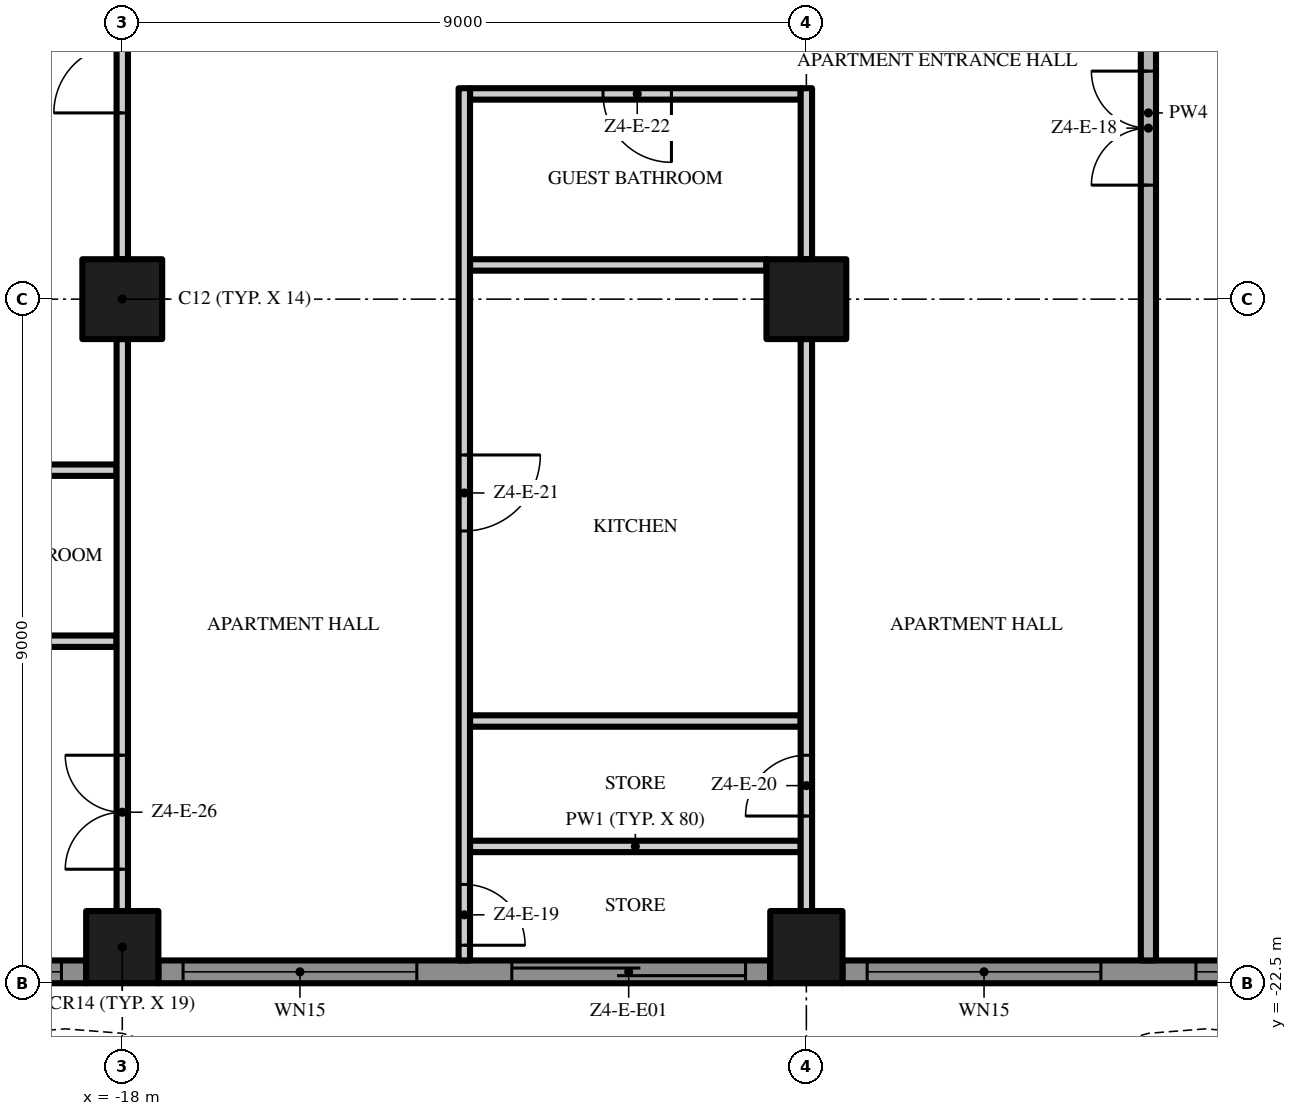
"""IFC4 building model, lengths in metres.
Left out: names, types, materials, properties, quantities, classifications, styles, units other than length and angle.
Written with IfcOpenShell. Run it as: python <this file> out.ifc"""

import sys

from ifc_helpers import new_model, si_unit, direction, frame, frame_2d, origin, origin_2d, place, context, subcontext, project, spatial, polyline, rectangle, outline, extrude, element, fill, save


model = new_model("IFC4")
c1 = context("Model", 3, precision=1e-05, world=origin(), true_north=direction((0.0, 1.0)))
c2 = subcontext(c1, "Body", "Model", "MODEL_VIEW")
j1 = project(units=[si_unit("LENGTHUNIT", "METRE"), si_unit("PLANEANGLEUNIT", "RADIAN")], contexts=[c1])
p1 = place(None, origin())
s1 = spatial("IfcSite", under=j1, at=p1, CompositionType="ELEMENT")
p2 = place(p1, origin())
s2 = spatial("IfcBuilding", under=s1, at=p2, CompositionType="ELEMENT")
p3 = place(p2, frame((0.0, 0.0, 226.2)))
s3 = spatial("IfcBuildingStorey", under=s2, at=p3, CompositionType="ELEMENT", Elevation=226.2)
p4 = place(p3, frame((-18.0, -13.5, 0.0), z_axis=(0.0, 0.0, 1.0), x_axis=(1.0, 0.0, 0.0)))
e1 = element("IfcColumn", 1, at=p4, inside=s3, PredefinedType="COLUMN", context=c2, shape_type="SweptSolid", body=[
    extrude(rectangle(XDim=1.05, YDim=1.05, at=origin_2d()), origin(), (0.0, 0.0, 1.0), 3.5),
])
p5 = place(p3, frame((-18.0, -22.025, 0.0), z_axis=(0.0, 0.0, 1.0), x_axis=(1.0, 0.0, 0.0)))
e2 = element("IfcColumn", 2, at=p5, inside=s3, PredefinedType="COLUMN", context=c2, shape_type="SweptSolid", body=[
    extrude(rectangle(XDim=0.95, YDim=0.95, at=origin_2d()), origin(), (0.0, 0.0, 1.0), 3.5),
])
p6 = place(p3, frame((-9.0, -13.5, 0.0), z_axis=(0.0, 0.0, 1.0), x_axis=(1.0, 0.0, 0.0)))
e3 = element("IfcColumn", 3, at=p6, inside=s3, PredefinedType="COLUMN", context=c2, shape_type="SweptSolid", body=[
    extrude(rectangle(XDim=1.05, YDim=1.05, at=origin_2d()), origin(), (0.0, 0.0, 1.0), 3.5),
])
p7 = place(p3, frame((-9.0, -22.025, 0.0), z_axis=(0.0, 0.0, 1.0), x_axis=(1.0, 0.0, 0.0)))
e4 = element("IfcColumn", 4, at=p7, inside=s3, PredefinedType="COLUMN", context=c2, shape_type="SweptSolid", body=[
    extrude(rectangle(XDim=0.95, YDim=0.95, at=origin_2d()), origin(), (0.0, 0.0, 1.0), 3.5),
])
p8 = place(p3, frame((-18.475, -22.35, 0.0), z_axis=(0.0, 0.0, 1.0), x_axis=(-1.0, 0.0, 0.0)))
e5 = element("IfcWall", 5, at=p8, inside=s3, PredefinedType="SOLIDWALL", context=c2, shape_type="SweptSolid", body=[
    extrude(rectangle(XDim=3.725, YDim=0.3, at=frame_2d((1.863, 0.0))), origin(), (0.0, 0.0, 1.0), 3.5),
])
p9 = place(p8, frame((0.325, 0.0, 0.45)))
e6 = element("IfcOpeningElement", 6, at=p9, cuts=e5, PredefinedType="OPENING", context=c2, shape_type="SweptSolid", body=[
    extrude(rectangle(XDim=3.075, YDim=2.65, at=frame_2d((1.538, 1.325))), frame((0.0, 0.16, 0.0), z_axis=(0.0, -1.0, 0.0), x_axis=(1.0, 0.0, 0.0)), (0.0, 0.0, 1.0), 0.32),
])
p10 = place(p3, frame((-9.475, -22.35, 0.0), z_axis=(0.0, 0.0, 1.0), x_axis=(-1.0, 0.0, 0.0)))
e7 = element("IfcWall", 7, at=p10, inside=s3, PredefinedType="SOLIDWALL", context=c2, shape_type="SweptSolid", body=[
    extrude(rectangle(XDim=8.05, YDim=0.3, at=frame_2d((4.025, 0.0))), origin(), (0.0, 0.0, 1.0), 3.5),
])
p11 = place(p10, frame((4.65, 0.0, 0.45)))
e8 = element("IfcOpeningElement", 8, at=p11, cuts=e7, PredefinedType="OPENING", context=c2, shape_type="SweptSolid", body=[
    extrude(rectangle(XDim=3.075, YDim=2.65, at=frame_2d((1.538, 1.325))), frame((0.0, 0.16, 0.0), z_axis=(0.0, -1.0, 0.0), x_axis=(1.0, 0.0, 0.0)), (0.0, 0.0, 1.0), 0.32),
])
p12 = place(p10, frame((0.325, 0.0, 0.0)))
e9 = element("IfcOpeningElement", 9, at=p12, cuts=e7, PredefinedType="OPENING", context=c2, shape_type="SweptSolid", body=[
    extrude(rectangle(XDim=3.075, YDim=2.4, at=frame_2d((1.538, 1.2))), frame((0.0, 0.16, 0.0), z_axis=(0.0, -1.0, 0.0), x_axis=(1.0, 0.0, 0.0)), (0.0, 0.0, 1.0), 0.32),
])
p13 = place(p3, frame((-0.475, -22.35, 0.0), z_axis=(0.0, 0.0, 1.0), x_axis=(-1.0, 0.0, 0.0)))
e10 = element("IfcWall", 10, at=p13, inside=s3, PredefinedType="SOLIDWALL", context=c2, shape_type="SweptSolid", body=[
    extrude(rectangle(XDim=8.05, YDim=0.3, at=frame_2d((4.025, 0.0))), origin(), (0.0, 0.0, 1.0), 3.5),
])
p14 = place(p13, frame((4.65, 0.0, 0.45)))
e11 = element("IfcOpeningElement", 11, at=p14, cuts=e10, PredefinedType="OPENING", context=c2, shape_type="SweptSolid", body=[
    extrude(rectangle(XDim=3.075, YDim=2.65, at=frame_2d((1.538, 1.325))), frame((0.0, 0.16, 0.0), z_axis=(0.0, -1.0, 0.0), x_axis=(1.0, 0.0, 0.0)), (0.0, 0.0, 1.0), 0.32),
])
p15 = place(p13, frame((0.325, 0.0, 0.45)))
e12 = element("IfcOpeningElement", 12, at=p15, cuts=e10, PredefinedType="OPENING", context=c2, shape_type="SweptSolid", body=[
    extrude(rectangle(XDim=3.075, YDim=2.65, at=frame_2d((1.538, 1.325))), frame((0.0, 0.16, 0.0), z_axis=(0.0, -1.0, 0.0), x_axis=(1.0, 0.0, 0.0)), (0.0, 0.0, 1.0), 0.32),
])
p16 = place(p3, origin())
e13 = element("IfcWall", 13, at=p16, inside=s3, PredefinedType="USERDEFINED", context=c2, shape_type="SweptSolid", body=[
    extrude(outline(polyline([(-22.5, -24.3), (-21.0, -23.595), (-19.5, -23.159), (-18.75, -23.1), (-18.0, -23.159), (-16.5, -23.595), (-15.0, -24.3), (-13.5, -25.005), (-12.0, -25.441), (-11.25, -25.5), (-10.5, -25.441), (-9.0, -25.005), (-7.5, -24.3), (-6.0, -23.595), (-4.5, -23.159), (-3.75, -23.1), (-3.0, -23.159), (-1.5, -23.595), (0.0, -24.3), (1.5, -25.005), (3.0, -25.441), (3.75, -25.5), (4.5, -25.441), (6.0, -25.005), (7.5, -24.3), (9.0, -23.595), (10.5, -23.159), (11.25, -23.1), (12.0, -23.159), (13.5, -23.595), (15.0, -24.3), (16.5, -25.005), (18.0, -25.441), (18.75, -25.5), (19.5, -25.441), (21.0, -25.005), (22.5, -24.3), (22.394, -24.074), (20.911, -24.771), (19.455, -25.194), (18.75, -25.249), (18.045, -25.194), (16.589, -24.771), (15.106, -24.074), (13.589, -23.36), (12.045, -22.911), (11.25, -22.849), (10.455, -22.911), (8.911, -23.36), (7.394, -24.074), (5.911, -24.771), (4.455, -25.194), (3.75, -25.249), (3.045, -25.194), (1.589, -24.771), (0.106, -24.074), (-1.411, -23.36), (-2.955, -22.911), (-3.75, -22.849), (-4.545, -22.911), (-6.089, -23.36), (-7.606, -24.074), (-9.089, -24.771), (-10.545, -25.194), (-11.25, -25.249), (-11.955, -25.194), (-13.411, -24.771), (-14.894, -24.074), (-16.411, -23.36), (-17.955, -22.911), (-18.75, -22.849), (-19.545, -22.911), (-21.089, -23.36), (-22.606, -24.074), (-22.5, -24.3)])), origin(), (0.0, 0.0, 1.0), 0.9),
])
for number, where, z_axis, x_axis in (
    (14, (-13.425, -20.7, 0.0), (0.0, 0.0, 1.0), (1.0, 0.0, 0.0)),
    (15, (-13.425, -19.05, 0.0), (0.0, 0.0, 1.0), (1.0, 0.0, 0.0)),
):
    element("IfcWall", number, at=place(p3, frame(where, z_axis=z_axis, x_axis=x_axis)), inside=s3, PredefinedType="PARTITIONING", context=c2, shape_type="SweptSolid", body=[
        extrude(rectangle(XDim=4.35, YDim=0.15, at=frame_2d((2.175, 0.0))), origin(), (0.0, 0.0, 1.0), 3.5),
    ])
p17 = place(p3, frame((-22.025, -18.0, 0.0), z_axis=(0.0, 0.0, 1.0), x_axis=(1.0, 0.0, 0.0)))
e16 = element("IfcWall", 16, at=p17, inside=s3, PredefinedType="PARTITIONING", context=c2, shape_type="SweptSolid", body=[
    extrude(rectangle(XDim=3.95, YDim=0.15, at=frame_2d((1.975, 0.0))), origin(), (0.0, 0.0, 1.0), 3.5),
])
p18 = place(p3, frame((-20.925, -15.75, 0.0), z_axis=(0.0, 0.0, 1.0), x_axis=(1.0, 0.0, 0.0)))
e17 = element("IfcWall", 17, at=p18, inside=s3, PredefinedType="PARTITIONING", context=c2, shape_type="SweptSolid", body=[
    extrude(rectangle(XDim=2.85, YDim=0.15, at=frame_2d((1.425, 0.0))), origin(), (0.0, 0.0, 1.0), 3.5),
])
p19 = place(p3, frame((-13.425, -13.05, 0.0), z_axis=(0.0, 0.0, 1.0), x_axis=(1.0, 0.0, 0.0)))
e18 = element("IfcWall", 18, at=p19, inside=s3, PredefinedType="PARTITIONING", context=c2, shape_type="SweptSolid", body=[
    extrude(rectangle(XDim=3.9, YDim=0.15, at=frame_2d((1.95, 0.0))), origin(), (0.0, 0.0, 1.0), 3.5),
])
p20 = place(p3, frame((-9.075, -10.8, 0.0), z_axis=(0.0, 0.0, 1.0), x_axis=(-1.0, 0.0, 0.0)))
e19 = element("IfcWall", 19, at=p20, inside=s3, PredefinedType="PARTITIONING", context=c2, shape_type="SweptSolid", body=[
    extrude(rectangle(XDim=4.35, YDim=0.15, at=frame_2d((2.175, 0.0))), origin(), (0.0, 0.0, 1.0), 3.5),
])
p21 = place(p20, frame((1.7, 0.0, 0.0)))
e20 = element("IfcOpeningElement", 20, at=p21, cuts=e19, PredefinedType="OPENING", context=c2, shape_type="SweptSolid", body=[
    extrude(rectangle(XDim=0.9, YDim=2.1, at=frame_2d((0.45, 1.05))), frame((0.0, 0.085, 0.0), z_axis=(0.0, -1.0, 0.0), x_axis=(1.0, 0.0, 0.0)), (0.0, 0.0, 1.0), 0.17),
])
p22 = place(p3, frame((-18.0, -21.55, 0.0), z_axis=(0.0, 0.0, 1.0), x_axis=(0.0, 1.0, 0.0)))
e21 = element("IfcWall", 21, at=p22, inside=s3, PredefinedType="PARTITIONING", context=c2, shape_type="SweptSolid", body=[
    extrude(rectangle(XDim=7.525, YDim=0.15, at=frame_2d((3.763, 0.0))), origin(), (0.0, 0.0, 1.0), 3.5),
])
p23 = place(p22, frame((0.55, 0.0, 0.0)))
e22 = element("IfcOpeningElement", 22, at=p23, cuts=e21, PredefinedType="OPENING", context=c2, shape_type="SweptSolid", body=[
    extrude(rectangle(XDim=1.5, YDim=2.4, at=frame_2d((0.75, 1.2))), frame((0.0, 0.085, 0.0), z_axis=(0.0, -1.0, 0.0), x_axis=(1.0, 0.0, 0.0)), (0.0, 0.0, 1.0), 0.17),
])
p24 = place(p3, frame((-18.0, -12.975, 0.0), z_axis=(0.0, 0.0, 1.0), x_axis=(0.0, 1.0, 0.0)))
e23 = element("IfcWall", 23, at=p24, inside=s3, PredefinedType="PARTITIONING", context=c2, shape_type="SweptSolid", body=[
    extrude(rectangle(XDim=7.95, YDim=0.15, at=frame_2d((3.975, 0.0))), origin(), (0.0, 0.0, 1.0), 3.5),
])
p25 = place(p24, frame((1.925, 0.0, 0.0)))
e24 = element("IfcOpeningElement", 24, at=p25, cuts=e23, PredefinedType="OPENING", context=c2, shape_type="SweptSolid", body=[
    extrude(rectangle(XDim=1.8, YDim=2.4, at=frame_2d((0.9, 1.2))), frame((0.0, 0.085, 0.0), z_axis=(0.0, -1.0, 0.0), x_axis=(1.0, 0.0, 0.0)), (0.0, 0.0, 1.0), 0.17),
])
p26 = place(p24, frame((6.8, 0.0, 0.0)))
e25 = element("IfcOpeningElement", 25, at=p26, cuts=e23, PredefinedType="OPENING", context=c2, shape_type="SweptSolid", body=[
    extrude(rectangle(XDim=1.0, YDim=2.4, at=frame_2d((0.5, 1.2))), frame((0.0, 0.085, 0.0), z_axis=(0.0, -1.0, 0.0), x_axis=(1.0, 0.0, 0.0)), (0.0, 0.0, 1.0), 0.17),
])
p27 = place(p3, frame((-13.5, -10.725, 0.0), z_axis=(0.0, 0.0, 1.0), x_axis=(0.0, -1.0, 0.0)))
e26 = element("IfcWall", 26, at=p27, inside=s3, PredefinedType="PARTITIONING", context=c2, shape_type="SweptSolid", body=[
    extrude(rectangle(XDim=11.475, YDim=0.15, at=frame_2d((5.737, 0.0))), origin(), (0.0, 0.0, 1.0), 3.5),
])
p28 = place(p27, frame((10.475, 0.0, 0.0)))
e27 = element("IfcOpeningElement", 27, at=p28, cuts=e26, PredefinedType="OPENING", context=c2, shape_type="SweptSolid", body=[
    extrude(rectangle(XDim=0.8, YDim=2.0, at=frame_2d((0.4, 1.0))), frame((0.0, 0.085, 0.0), z_axis=(0.0, -1.0, 0.0), x_axis=(1.0, 0.0, 0.0)), (0.0, 0.0, 1.0), 0.17),
])
p29 = place(p27, frame((4.825, 0.0, 0.0)))
e28 = element("IfcOpeningElement", 28, at=p29, cuts=e26, PredefinedType="OPENING", context=c2, shape_type="SweptSolid", body=[
    extrude(rectangle(XDim=1.0, YDim=2.4, at=frame_2d((0.5, 1.2))), frame((0.0, 0.085, 0.0), z_axis=(0.0, -1.0, 0.0), x_axis=(1.0, 0.0, 0.0)), (0.0, 0.0, 1.0), 0.17),
])
p30 = place(p3, frame((-9.0, -21.55, 0.0), z_axis=(0.0, 0.0, 1.0), x_axis=(0.0, 1.0, 0.0)))
e29 = element("IfcWall", 29, at=p30, inside=s3, PredefinedType="PARTITIONING", context=c2, shape_type="SweptSolid", body=[
    extrude(rectangle(XDim=7.525, YDim=0.15, at=frame_2d((3.763, 0.0))), origin(), (0.0, 0.0, 1.0), 3.5),
])
p31 = place(p30, frame((1.25, 0.0, 0.0)))
e30 = element("IfcOpeningElement", 30, at=p31, cuts=e29, PredefinedType="OPENING", context=c2, shape_type="SweptSolid", body=[
    extrude(rectangle(XDim=0.8, YDim=2.0, at=frame_2d((0.4, 1.0))), frame((0.0, 0.085, 0.0), z_axis=(0.0, -1.0, 0.0), x_axis=(1.0, 0.0, 0.0)), (0.0, 0.0, 1.0), 0.17),
])
p32 = place(p3, frame((-9.0, -12.975, 0.0), z_axis=(0.0, 0.0, 1.0), x_axis=(0.0, 1.0, 0.0)))
e31 = element("IfcWall", 31, at=p32, inside=s3, PredefinedType="PARTITIONING", context=c2, shape_type="SweptSolid", body=[
    extrude(rectangle(XDim=2.25, YDim=0.15, at=frame_2d((1.125, 0.0))), origin(), (0.0, 0.0, 1.0), 3.5),
])
p33 = place(p3, frame((-4.5, -22.2, 0.0), z_axis=(0.0, 0.0, 1.0), x_axis=(0.0, 1.0, 0.0)))
e32 = element("IfcWall", 32, at=p33, inside=s3, PredefinedType="PARTITIONING", context=c2, shape_type="SweptSolid", body=[
    extrude(rectangle(XDim=22.3, YDim=0.2, at=frame_2d((11.15, 0.0))), origin(), (0.0, 0.0, 1.0), 3.5),
])
p34 = place(p33, frame((10.2, 0.0, 0.0)))
e33 = element("IfcOpeningElement", 33, at=p34, cuts=e32, PredefinedType="OPENING", context=c2, shape_type="SweptSolid", body=[
    extrude(rectangle(XDim=1.5, YDim=2.4, at=frame_2d((0.75, 1.2))), frame((0.0, 0.11, 0.0), z_axis=(0.0, -1.0, 0.0), x_axis=(1.0, 0.0, 0.0)), (0.0, 0.0, 1.0), 0.22),
])
p35 = place(p9, origin())
e34 = element("IfcWindow", 34, at=p35, inside=s3, PartitioningType="SINGLE_PANEL", PredefinedType="WINDOW", context=c2, shape_type="SweptSolid", body=[
    extrude(rectangle(XDim=3.075, YDim=2.65, at=frame_2d((1.538, 1.325))), frame((0.0, 0.03, 0.0), z_axis=(0.0, -1.0, 0.0), x_axis=(1.0, 0.0, 0.0)), (0.0, 0.0, 1.0), 0.06),
])
fill(e6, e34)
p36 = place(p11, origin())
e35 = element("IfcWindow", 35, at=p36, inside=s3, PartitioningType="SINGLE_PANEL", PredefinedType="WINDOW", context=c2, shape_type="SweptSolid", body=[
    extrude(rectangle(XDim=3.075, YDim=2.65, at=frame_2d((1.538, 1.325))), frame((0.0, 0.03, 0.0), z_axis=(0.0, -1.0, 0.0), x_axis=(1.0, 0.0, 0.0)), (0.0, 0.0, 1.0), 0.06),
])
fill(e8, e35)
p37 = place(p12, origin())
e36 = element("IfcDoor", 36, at=p37, inside=s3, OperationType="SINGLE_SWING_LEFT", PredefinedType="DOOR", context=c2, shape_type="SweptSolid", body=[
    extrude(rectangle(XDim=3.075, YDim=2.4, at=frame_2d((1.538, 1.2))), frame((0.0, 0.025, 0.0), z_axis=(0.0, -1.0, 0.0), x_axis=(1.0, 0.0, 0.0)), (0.0, 0.0, 1.0), 0.05),
])
fill(e9, e36)
p38 = place(p14, origin())
e37 = element("IfcWindow", 37, at=p38, inside=s3, PartitioningType="SINGLE_PANEL", PredefinedType="WINDOW", context=c2, shape_type="SweptSolid", body=[
    extrude(rectangle(XDim=3.075, YDim=2.65, at=frame_2d((1.538, 1.325))), frame((0.0, 0.03, 0.0), z_axis=(0.0, -1.0, 0.0), x_axis=(1.0, 0.0, 0.0)), (0.0, 0.0, 1.0), 0.06),
])
fill(e11, e37)
p39 = place(p15, origin())
e38 = element("IfcWindow", 38, at=p39, inside=s3, PartitioningType="SINGLE_PANEL", PredefinedType="WINDOW", context=c2, shape_type="SweptSolid", body=[
    extrude(rectangle(XDim=3.075, YDim=2.65, at=frame_2d((1.538, 1.325))), frame((0.0, 0.03, 0.0), z_axis=(0.0, -1.0, 0.0), x_axis=(1.0, 0.0, 0.0)), (0.0, 0.0, 1.0), 0.06),
])
fill(e12, e38)
p40 = place(p34, origin())
e39 = element("IfcDoor", 39, at=p40, inside=s3, OperationType="DOUBLE_DOOR_SINGLE_SWING", PredefinedType="DOOR", context=c2, shape_type="SweptSolid", body=[
    extrude(rectangle(XDim=1.5, YDim=2.4, at=frame_2d((0.75, 1.2))), frame((0.0, 0.025, 0.0), z_axis=(0.0, -1.0, 0.0), x_axis=(1.0, 0.0, 0.0)), (0.0, 0.0, 1.0), 0.05),
])
fill(e33, e39)
p41 = place(p28, origin())
e40 = element("IfcDoor", 40, at=p41, inside=s3, OperationType="SINGLE_SWING_RIGHT", PredefinedType="DOOR", context=c2, shape_type="SweptSolid", body=[
    extrude(rectangle(XDim=0.8, YDim=2.0, at=frame_2d((0.4, 1.0))), frame((0.0, 0.025, 0.0), z_axis=(0.0, -1.0, 0.0), x_axis=(1.0, 0.0, 0.0)), (0.0, 0.0, 1.0), 0.05),
])
fill(e27, e40)
p42 = place(p31, origin())
e41 = element("IfcDoor", 41, at=p42, inside=s3, OperationType="SINGLE_SWING_LEFT", PredefinedType="DOOR", context=c2, shape_type="SweptSolid", body=[
    extrude(rectangle(XDim=0.8, YDim=2.0, at=frame_2d((0.4, 1.0))), frame((0.0, 0.025, 0.0), z_axis=(0.0, -1.0, 0.0), x_axis=(1.0, 0.0, 0.0)), (0.0, 0.0, 1.0), 0.05),
])
fill(e30, e41)
p43 = place(p29, origin())
e42 = element("IfcDoor", 42, at=p43, inside=s3, OperationType="SINGLE_SWING_LEFT", PredefinedType="DOOR", context=c2, shape_type="SweptSolid", body=[
    extrude(rectangle(XDim=1.0, YDim=2.4, at=frame_2d((0.5, 1.2))), frame((0.0, 0.025, 0.0), z_axis=(0.0, -1.0, 0.0), x_axis=(1.0, 0.0, 0.0)), (0.0, 0.0, 1.0), 0.05),
])
fill(e28, e42)
p44 = place(p21, origin())
e43 = element("IfcDoor", 43, at=p44, inside=s3, OperationType="SINGLE_SWING_LEFT", PredefinedType="DOOR", context=c2, shape_type="SweptSolid", body=[
    extrude(rectangle(XDim=0.9, YDim=2.1, at=frame_2d((0.45, 1.05))), frame((0.0, 0.025, 0.0), z_axis=(0.0, -1.0, 0.0), x_axis=(1.0, 0.0, 0.0)), (0.0, 0.0, 1.0), 0.05),
])
fill(e20, e43)
p45 = place(p23, origin())
e44 = element("IfcDoor", 44, at=p45, inside=s3, OperationType="DOUBLE_DOOR_SINGLE_SWING", PredefinedType="DOOR", context=c2, shape_type="SweptSolid", body=[
    extrude(rectangle(XDim=1.5, YDim=2.4, at=frame_2d((0.75, 1.2))), frame((0.0, 0.025, 0.0), z_axis=(0.0, -1.0, 0.0), x_axis=(1.0, 0.0, 0.0)), (0.0, 0.0, 1.0), 0.05),
])
fill(e22, e44)
p46 = place(p25, origin())
e45 = element("IfcDoor", 45, at=p46, inside=s3, OperationType="DOUBLE_DOOR_SINGLE_SWING", PredefinedType="DOOR", context=c2, shape_type="SweptSolid", body=[
    extrude(rectangle(XDim=1.8, YDim=2.4, at=frame_2d((0.9, 1.2))), frame((0.0, 0.025, 0.0), z_axis=(0.0, -1.0, 0.0), x_axis=(1.0, 0.0, 0.0)), (0.0, 0.0, 1.0), 0.05),
])
fill(e24, e45)
save(model, sys.argv[1])
